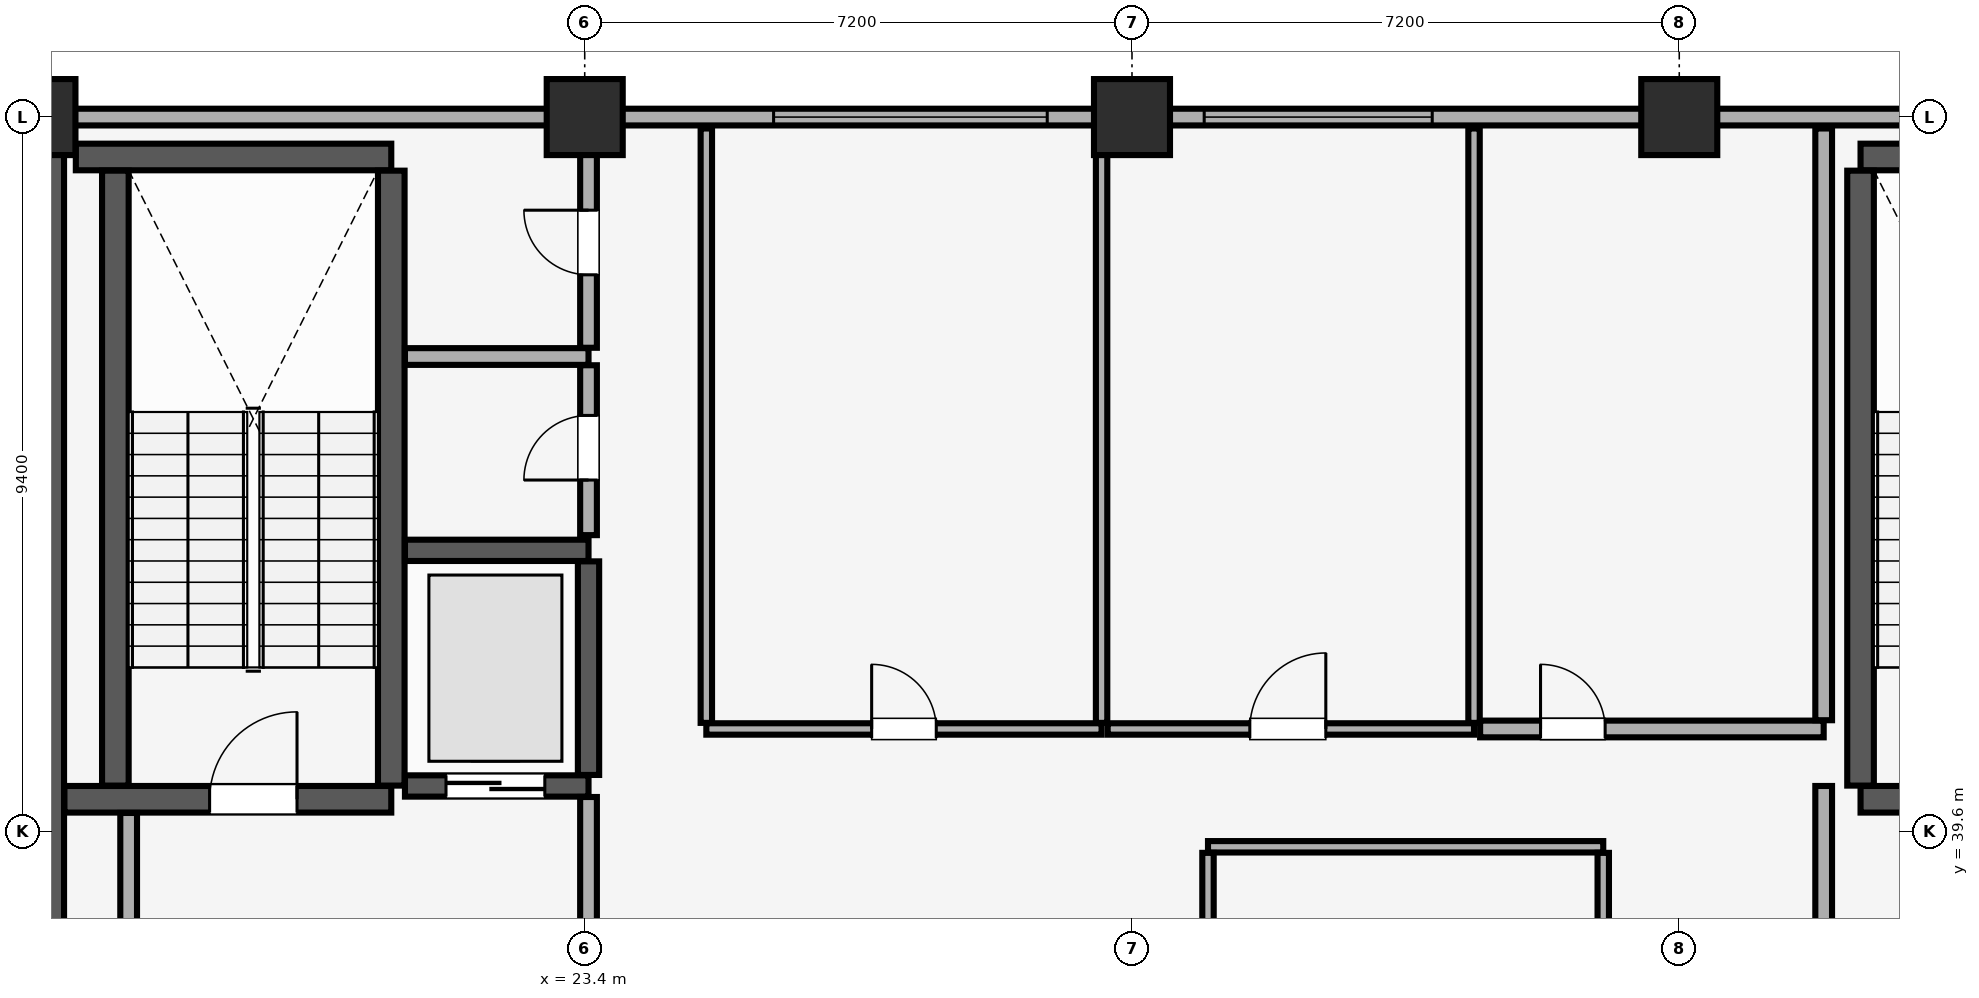
"""IFC4 building model, lengths in metres.
Left out: names, types, materials, properties, quantities, classifications, styles, units other than length and angle.
Written with IfcOpenShell. Run it as: python <this file> out.ifc"""

import sys

from ifc_helpers import new_model, si_unit, direction, frame, frame_2d, origin, origin_2d, place, context, subcontext, project, spatial, rectangle, extrude, element, fill, save


model = new_model("IFC4")
c1 = context("Model", 3, precision=1e-05, world=origin(), true_north=direction((0.0, 1.0)))
c2 = subcontext(c1, "Body", "Model", "MODEL_VIEW")
j1 = project(units=[si_unit("LENGTHUNIT", "METRE"), si_unit("PLANEANGLEUNIT", "RADIAN")], contexts=[c1])
p1 = place(None, origin())
s1 = spatial("IfcSite", under=j1, at=p1, CompositionType="ELEMENT")
p2 = place(p1, origin())
s2 = spatial("IfcBuilding", under=s1, at=p2, CompositionType="ELEMENT")
p3 = place(p2, frame((0.0, 0.0, 285.9)))
s3 = spatial("IfcBuildingStorey", under=s2, at=p3, CompositionType="ELEMENT", Elevation=285.9)
for number, where, z_axis, x_axis in (
    (1, (16.2, 49.0, 0.0), (0.0, 0.0, 1.0), (1.0, 0.0, 0.0)),
    (2, (23.4, 49.0, 0.0), (0.0, 0.0, 1.0), (1.0, 0.0, 0.0)),
    (3, (30.6, 49.0, 0.0), (0.0, 0.0, 1.0), (1.0, 0.0, 0.0)),
    (4, (37.8, 49.0, 0.0), (0.0, 0.0, 1.0), (1.0, 0.0, 0.0)),
):
    element("IfcColumn", number, at=place(p3, frame(where, z_axis=z_axis, x_axis=x_axis)), inside=s3, PredefinedType="COLUMN", context=c2, shape_type="SweptSolid", body=[
        extrude(rectangle(XDim=1.0, YDim=1.0, at=origin_2d()), origin(), (0.0, 0.0, 1.0), 4.1),
    ])
p4 = place(p3, frame((71.4, 49.0, 0.0), z_axis=(0.0, 0.0, 1.0), x_axis=(-1.0, 0.0, 0.0)))
e5 = element("IfcWall", 5, at=p4, inside=s3, PredefinedType="SOLIDWALL", context=c2, shape_type="SweptSolid", body=[
    extrude(rectangle(XDim=58.8, YDim=0.22, at=frame_2d((29.4, 0.0))), origin(), (0.0, 0.0, 1.0), 3.3),
])
p5 = place(p4, frame((56.365, 0.0, 0.85)))
e6 = element("IfcOpeningElement", 6, at=p5, cuts=e5, PredefinedType="OPENING", context=c2, shape_type="SweptSolid", body=[
    extrude(rectangle(XDim=1.5, YDim=1.4, at=frame_2d((0.75, 0.7))), frame((0.0, 0.12, 0.0), z_axis=(0.0, -1.0, 0.0), x_axis=(1.0, 0.0, 0.0)), (0.0, 0.0, 1.0), 0.24),
])
p6 = place(p4, frame((0.935, 0.0, 0.85)))
e7 = element("IfcOpeningElement", 7, at=p6, cuts=e5, PredefinedType="OPENING", context=c2, shape_type="SweptSolid", body=[
    extrude(rectangle(XDim=1.5, YDim=1.4, at=frame_2d((0.75, 0.7))), frame((0.0, 0.12, 0.0), z_axis=(0.0, -1.0, 0.0), x_axis=(1.0, 0.0, 0.0)), (0.0, 0.0, 1.0), 0.24),
])
p7 = place(p4, frame((41.915, 0.0, 0.9)))
e8 = element("IfcOpeningElement", 8, at=p7, cuts=e5, PredefinedType="OPENING", context=c2, shape_type="SweptSolid", body=[
    extrude(rectangle(XDim=3.6, YDim=1.5, at=frame_2d((1.8, 0.75))), frame((0.0, 0.12, 0.0), z_axis=(0.0, -1.0, 0.0), x_axis=(1.0, 0.0, 0.0)), (0.0, 0.0, 1.0), 0.24),
])
p8 = place(p4, frame((36.85, 0.0, 0.9)))
e9 = element("IfcOpeningElement", 9, at=p8, cuts=e5, PredefinedType="OPENING", context=c2, shape_type="SweptSolid", body=[
    extrude(rectangle(XDim=3.0, YDim=1.5, at=frame_2d((1.5, 0.75))), frame((0.0, 0.12, 0.0), z_axis=(0.0, -1.0, 0.0), x_axis=(1.0, 0.0, 0.0)), (0.0, 0.0, 1.0), 0.24),
])
p9 = place(p4, frame((19.7, 0.0, 0.9)))
e10 = element("IfcOpeningElement", 10, at=p9, cuts=e5, PredefinedType="OPENING", context=c2, shape_type="SweptSolid", body=[
    extrude(rectangle(XDim=3.6, YDim=1.5, at=frame_2d((1.8, 0.75))), frame((0.0, 0.12, 0.0), z_axis=(0.0, -1.0, 0.0), x_axis=(1.0, 0.0, 0.0)), (0.0, 0.0, 1.0), 0.24),
])
p10 = place(p4, frame((14.635, 0.0, 0.9)))
e11 = element("IfcOpeningElement", 11, at=p10, cuts=e5, PredefinedType="OPENING", context=c2, shape_type="SweptSolid", body=[
    extrude(rectangle(XDim=2.4, YDim=1.5, at=frame_2d((1.2, 0.75))), frame((0.0, 0.12, 0.0), z_axis=(0.0, -1.0, 0.0), x_axis=(1.0, 0.0, 0.0)), (0.0, 0.0, 1.0), 0.24),
])
p11 = place(p3, frame((16.2, 29.4, 0.0), z_axis=(0.0, 0.0, 1.0), x_axis=(0.0, 1.0, 0.0)))
e12 = element("IfcWall", 12, at=p11, inside=s3, PredefinedType="SHEAR", context=c2, shape_type="SweptSolid", body=[
    extrude(rectangle(XDim=19.2, YDim=0.7, at=frame_2d((9.6, 0.0))), origin(), (0.0, 0.0, 1.0), 4.1),
])
p12 = place(p3, frame((16.555, 40.025, 0.0), z_axis=(0.0, 0.0, 1.0), x_axis=(1.0, 0.0, 0.0)))
e13 = element("IfcWall", 13, at=p12, inside=s3, PredefinedType="SHEAR", context=c2, shape_type="SweptSolid", body=[
    extrude(rectangle(XDim=4.3, YDim=0.35, at=frame_2d((2.15, 0.0))), origin(), (0.0, 0.0, 1.0), 4.1),
])
p13 = place(p12, frame((1.91, 0.0, 0.0)))
e14 = element("IfcOpeningElement", 14, at=p13, cuts=e13, PredefinedType="OPENING", context=c2, shape_type="SweptSolid", body=[
    extrude(rectangle(XDim=1.15, YDim=2.15, at=frame_2d((0.575, 1.075))), frame((0.0, 0.185, 0.0), z_axis=(0.0, -1.0, 0.0), x_axis=(1.0, 0.0, 0.0)), (0.0, 0.0, 1.0), 0.37),
])
p14 = place(p3, frame((16.705, 48.475, 0.0), z_axis=(0.0, 0.0, 1.0), x_axis=(1.0, 0.0, 0.0)))
e15 = element("IfcWall", 15, at=p14, inside=s3, PredefinedType="SHEAR", context=c2, shape_type="SweptSolid", body=[
    extrude(rectangle(XDim=4.15, YDim=0.35, at=frame_2d((2.075, 0.0))), origin(), (0.0, 0.0, 1.0), 4.1),
])
for number, where, z_axis, x_axis in (
    (16, (17.225, 40.205, 0.0), (0.0, 0.0, 1.0), (0.0, 1.0, 0.0)),
    (17, (20.855, 40.205, 0.0), (0.0, 0.0, 1.0), (0.0, 1.0, 0.0)),
):
    element("IfcWall", number, at=place(p3, frame(where, z_axis=z_axis, x_axis=x_axis)), inside=s3, PredefinedType="SHEAR", context=c2, shape_type="SweptSolid", body=[
        extrude(rectangle(XDim=8.09, YDim=0.35, at=frame_2d((4.045, 0.0))), origin(), (0.0, 0.0, 1.0), 4.1),
    ])
p15 = place(p3, frame((40.185, 40.025, 0.0), z_axis=(0.0, 0.0, 1.0), x_axis=(1.0, 0.0, 0.0)))
e18 = element("IfcWall", 18, at=p15, inside=s3, PredefinedType="SHEAR", context=c2, shape_type="SweptSolid", body=[
    extrude(rectangle(XDim=3.63, YDim=0.35, at=frame_2d((1.815, 0.0))), origin(), (0.0, 0.0, 1.0), 4.1),
])
p16 = place(p15, frame((1.24, 0.0, 0.0)))
e19 = element("IfcOpeningElement", 19, at=p16, cuts=e18, PredefinedType="OPENING", context=c2, shape_type="SweptSolid", body=[
    extrude(rectangle(XDim=1.15, YDim=2.15, at=frame_2d((0.575, 1.075))), frame((0.0, 0.185, 0.0), z_axis=(0.0, -1.0, 0.0), x_axis=(1.0, 0.0, 0.0)), (0.0, 0.0, 1.0), 0.37),
])
p17 = place(p3, frame((40.185, 48.475, 0.0), z_axis=(0.0, 0.0, 1.0), x_axis=(1.0, 0.0, 0.0)))
e20 = element("IfcWall", 20, at=p17, inside=s3, PredefinedType="SHEAR", context=c2, shape_type="SweptSolid", body=[
    extrude(rectangle(XDim=3.63, YDim=0.35, at=frame_2d((1.815, 0.0))), origin(), (0.0, 0.0, 1.0), 4.1),
])
p18 = place(p3, frame((40.185, 40.205, 0.0), z_axis=(0.0, 0.0, 1.0), x_axis=(0.0, 1.0, 0.0)))
e21 = element("IfcWall", 21, at=p18, inside=s3, PredefinedType="SHEAR", context=c2, shape_type="SweptSolid", body=[
    extrude(rectangle(XDim=8.09, YDim=0.35, at=frame_2d((4.045, 0.0))), origin(), (0.0, 0.0, 1.0), 4.1),
])
p19 = place(p3, frame((21.035, 40.2, 0.0), z_axis=(0.0, 0.0, 1.0), x_axis=(1.0, 0.0, 0.0)))
e22 = element("IfcWall", 22, at=p19, inside=s3, PredefinedType="SHEAR", context=c2, shape_type="SweptSolid", body=[
    extrude(rectangle(XDim=2.415, YDim=0.28, at=frame_2d((1.208, 0.0))), origin(), (0.0, 0.0, 1.0), 4.1),
])
p20 = place(p19, frame((0.54, 0.0, 0.0)))
e23 = element("IfcOpeningElement", 23, at=p20, cuts=e22, PredefinedType="OPENING", context=c2, shape_type="SweptSolid", body=[
    extrude(rectangle(XDim=1.3, YDim=2.3, at=frame_2d((0.65, 1.15))), frame((0.0, 0.15, 0.0), z_axis=(0.0, -1.0, 0.0), x_axis=(1.0, 0.0, 0.0)), (0.0, 0.0, 1.0), 0.3),
])
p21 = place(p3, frame((21.035, 43.3, 0.0), z_axis=(0.0, 0.0, 1.0), x_axis=(1.0, 0.0, 0.0)))
e24 = element("IfcWall", 24, at=p21, inside=s3, PredefinedType="SHEAR", context=c2, shape_type="SweptSolid", body=[
    extrude(rectangle(XDim=2.415, YDim=0.28, at=frame_2d((1.208, 0.0))), origin(), (0.0, 0.0, 1.0), 4.1),
])
p22 = place(p3, frame((23.45, 40.345, 0.0), z_axis=(0.0, 0.0, 1.0), x_axis=(0.0, 1.0, 0.0)))
e25 = element("IfcWall", 25, at=p22, inside=s3, PredefinedType="SHEAR", context=c2, shape_type="SweptSolid", body=[
    extrude(rectangle(XDim=2.81, YDim=0.28, at=frame_2d((1.405, 0.0))), origin(), (0.0, 0.0, 1.0), 4.1),
])
p23 = place(p3, frame((17.4, 34.415, 0.0), z_axis=(0.0, 0.0, 1.0), x_axis=(0.0, 1.0, 0.0)))
e26 = element("IfcWall", 26, at=p23, inside=s3, PredefinedType="PARTITIONING", context=c2, shape_type="SweptSolid", body=[
    extrude(rectangle(XDim=5.43, YDim=0.22, at=frame_2d((2.715, 0.0))), origin(), (0.0, 0.0, 1.0), 4.1),
])
p24 = place(p3, frame((23.45, 34.415, 0.0), z_axis=(0.0, 0.0, 1.0), x_axis=(0.0, 1.0, 0.0)))
e27 = element("IfcWall", 27, at=p24, inside=s3, PredefinedType="PARTITIONING", context=c2, shape_type="SweptSolid", body=[
    extrude(rectangle(XDim=5.64, YDim=0.22, at=frame_2d((2.82, 0.0))), origin(), (0.0, 0.0, 1.0), 4.1),
])
p25 = place(p3, frame((39.7, 34.415, 0.0), z_axis=(0.0, 0.0, 1.0), x_axis=(0.0, 1.0, 0.0)))
e28 = element("IfcWall", 28, at=p25, inside=s3, PredefinedType="PARTITIONING", context=c2, shape_type="SweptSolid", body=[
    extrude(rectangle(XDim=5.785, YDim=0.22, at=frame_2d((2.893, 0.0))), origin(), (0.0, 0.0, 1.0), 4.1),
])
p26 = place(p3, frame((21.035, 45.85, 0.0), z_axis=(0.0, 0.0, 1.0), x_axis=(1.0, 0.0, 0.0)))
e29 = element("IfcWall", 29, at=p26, inside=s3, PredefinedType="PARTITIONING", context=c2, shape_type="SweptSolid", body=[
    extrude(rectangle(XDim=2.415, YDim=0.22, at=frame_2d((1.208, 0.0))), origin(), (0.0, 0.0, 1.0), 4.1),
])
p27 = place(p3, frame((23.45, 43.5, 0.0), z_axis=(0.0, 0.0, 1.0), x_axis=(0.0, 1.0, 0.0)))
e30 = element("IfcWall", 30, at=p27, inside=s3, PredefinedType="PARTITIONING", context=c2, shape_type="SweptSolid", body=[
    extrude(rectangle(XDim=2.235, YDim=0.22, at=frame_2d((1.118, 0.0))), origin(), (0.0, 0.0, 1.0), 4.1),
])
p28 = place(p27, frame((0.725, 0.0, 0.0)))
e31 = element("IfcOpeningElement", 31, at=p28, cuts=e30, PredefinedType="OPENING", context=c2, shape_type="SweptSolid", body=[
    extrude(rectangle(XDim=0.85, YDim=2.1, at=frame_2d((0.425, 1.05))), frame((0.0, 0.12, 0.0), z_axis=(0.0, -1.0, 0.0), x_axis=(1.0, 0.0, 0.0)), (0.0, 0.0, 1.0), 0.24),
])
p29 = place(p3, frame((23.45, 45.965, 0.0), z_axis=(0.0, 0.0, 1.0), x_axis=(0.0, 1.0, 0.0)))
e32 = element("IfcWall", 32, at=p29, inside=s3, PredefinedType="PARTITIONING", context=c2, shape_type="SweptSolid", body=[
    extrude(rectangle(XDim=2.885, YDim=0.22, at=frame_2d((1.442, 0.0))), origin(), (0.0, 0.0, 1.0), 4.1),
])
p30 = place(p29, frame((0.96, 0.0, 0.0)))
e33 = element("IfcOpeningElement", 33, at=p30, cuts=e32, PredefinedType="OPENING", context=c2, shape_type="SweptSolid", body=[
    extrude(rectangle(XDim=0.85, YDim=2.1, at=frame_2d((0.425, 1.05))), frame((0.0, 0.12, 0.0), z_axis=(0.0, -1.0, 0.0), x_axis=(1.0, 0.0, 0.0)), (0.0, 0.0, 1.0), 0.24),
])
p31 = place(p3, frame((31.6, 39.4, 0.0), z_axis=(0.0, 0.0, 1.0), x_axis=(1.0, 0.0, 0.0)))
e34 = element("IfcWall", 34, at=p31, inside=s3, PredefinedType="PARTITIONING", context=c2, shape_type="SweptSolid", body=[
    extrude(rectangle(XDim=5.2, YDim=0.15, at=frame_2d((2.6, 0.0))), origin(), (0.0, 0.0, 1.0), 4.1),
])
for number, where, z_axis, x_axis in (
    (35, (31.6, 34.38, 0.0), (0.0, 0.0, 1.0), (0.0, 1.0, 0.0)),
    (36, (36.8, 34.38, 0.0), (0.0, 0.0, 1.0), (0.0, 1.0, 0.0)),
):
    element("IfcWall", number, at=place(p3, frame(where, z_axis=z_axis, x_axis=x_axis)), inside=s3, PredefinedType="PARTITIONING", context=c2, shape_type="SweptSolid", body=[
        extrude(rectangle(XDim=4.94, YDim=0.15, at=frame_2d((2.47, 0.0))), origin(), (0.0, 0.0, 1.0), 4.1),
    ])
p32 = place(p3, frame((25.0, 40.95, 0.0), z_axis=(0.0, 0.0, 1.0), x_axis=(1.0, 0.0, 0.0)))
e37 = element("IfcWall", 37, at=p32, inside=s3, PredefinedType="PARTITIONING", context=c2, shape_type="SweptSolid", body=[
    extrude(rectangle(XDim=5.2, YDim=0.15, at=frame_2d((2.6, 0.0))), origin(), (0.0, 0.0, 1.0), 4.1),
])
p33 = place(p32, frame((2.175, 0.0, 0.0)))
e38 = element("IfcOpeningElement", 38, at=p33, cuts=e37, PredefinedType="OPENING", context=c2, shape_type="SweptSolid", body=[
    extrude(rectangle(XDim=0.85, YDim=2.1, at=frame_2d((0.425, 1.05))), frame((0.0, 0.085, 0.0), z_axis=(0.0, -1.0, 0.0), x_axis=(1.0, 0.0, 0.0)), (0.0, 0.0, 1.0), 0.17),
])
for number, where, z_axis, x_axis in (
    (39, (25.0, 41.03, 0.0), (0.0, 0.0, 1.0), (0.0, 1.0, 0.0)),
    (40, (30.2, 41.03, 0.0), (0.0, 0.0, 1.0), (0.0, 1.0, 0.0)),
):
    element("IfcWall", number, at=place(p3, frame(where, z_axis=z_axis, x_axis=x_axis)), inside=s3, PredefinedType="PARTITIONING", context=c2, shape_type="SweptSolid", body=[
        extrude(rectangle(XDim=7.82, YDim=0.15, at=frame_2d((3.91, 0.0))), origin(), (0.0, 0.0, 1.0), 4.1),
    ])
p34 = place(p3, frame((30.28, 40.95, 0.0), z_axis=(0.0, 0.0, 1.0), x_axis=(1.0, 0.0, 0.0)))
e41 = element("IfcWall", 41, at=p34, inside=s3, PredefinedType="PARTITIONING", context=c2, shape_type="SweptSolid", body=[
    extrude(rectangle(XDim=4.82, YDim=0.15, at=frame_2d((2.41, 0.0))), origin(), (0.0, 0.0, 1.0), 4.1),
])
p35 = place(p34, frame((1.87, 0.0, 0.0)))
e42 = element("IfcOpeningElement", 42, at=p35, cuts=e41, PredefinedType="OPENING", context=c2, shape_type="SweptSolid", body=[
    extrude(rectangle(XDim=1.0, YDim=2.15, at=frame_2d((0.5, 1.075))), frame((0.0, 0.085, 0.0), z_axis=(0.0, -1.0, 0.0), x_axis=(1.0, 0.0, 0.0)), (0.0, 0.0, 1.0), 0.17),
])
p36 = place(p3, frame((35.1, 41.03, 0.0), z_axis=(0.0, 0.0, 1.0), x_axis=(0.0, 1.0, 0.0)))
e43 = element("IfcWall", 43, at=p36, inside=s3, PredefinedType="PARTITIONING", context=c2, shape_type="SweptSolid", body=[
    extrude(rectangle(XDim=7.82, YDim=0.15, at=frame_2d((3.91, 0.0))), origin(), (0.0, 0.0, 1.0), 4.1),
])
p37 = place(p3, frame((35.18, 40.95, 0.0), z_axis=(0.0, 0.0, 1.0), x_axis=(1.0, 0.0, 0.0)))
e44 = element("IfcWall", 44, at=p37, inside=s3, PredefinedType="PARTITIONING", context=c2, shape_type="SweptSolid", body=[
    extrude(rectangle(XDim=4.52, YDim=0.22, at=frame_2d((2.26, 0.0))), origin(), (0.0, 0.0, 1.0), 4.1),
])
p38 = place(p37, frame((0.795, 0.0, 0.0)))
e45 = element("IfcOpeningElement", 45, at=p38, cuts=e44, PredefinedType="OPENING", context=c2, shape_type="SweptSolid", body=[
    extrude(rectangle(XDim=0.85, YDim=2.1, at=frame_2d((0.425, 1.05))), frame((0.0, 0.12, 0.0), z_axis=(0.0, -1.0, 0.0), x_axis=(1.0, 0.0, 0.0)), (0.0, 0.0, 1.0), 0.24),
])
p39 = place(p3, frame((39.7, 41.065, 0.0), z_axis=(0.0, 0.0, 1.0), x_axis=(0.0, 1.0, 0.0)))
e46 = element("IfcWall", 46, at=p39, inside=s3, PredefinedType="PARTITIONING", context=c2, shape_type="SweptSolid", body=[
    extrude(rectangle(XDim=7.785, YDim=0.22, at=frame_2d((3.893, 0.0))), origin(), (0.0, 0.0, 1.0), 4.1),
])
p40 = place(p7, origin())
e47 = element("IfcWindow", 47, at=p40, inside=s3, PartitioningType="SINGLE_PANEL", PredefinedType="WINDOW", context=c2, shape_type="SweptSolid", body=[
    extrude(rectangle(XDim=3.6, YDim=1.5, at=frame_2d((1.8, 0.75))), frame((0.0, 0.03, 0.0), z_axis=(0.0, -1.0, 0.0), x_axis=(1.0, 0.0, 0.0)), (0.0, 0.0, 1.0), 0.06),
])
fill(e8, e47)
p41 = place(p8, origin())
e48 = element("IfcWindow", 48, at=p41, inside=s3, PartitioningType="SINGLE_PANEL", PredefinedType="WINDOW", context=c2, shape_type="SweptSolid", body=[
    extrude(rectangle(XDim=3.0, YDim=1.5, at=frame_2d((1.5, 0.75))), frame((0.0, 0.03, 0.0), z_axis=(0.0, -1.0, 0.0), x_axis=(1.0, 0.0, 0.0)), (0.0, 0.0, 1.0), 0.06),
])
fill(e9, e48)
p42 = place(p13, origin())
e49 = element("IfcDoor", 49, at=p42, inside=s3, OperationType="SINGLE_SWING_RIGHT", PredefinedType="DOOR", context=c2, shape_type="SweptSolid", body=[
    extrude(rectangle(XDim=1.15, YDim=2.15, at=frame_2d((0.575, 1.075))), frame((0.0, 0.025, 0.0), z_axis=(0.0, -1.0, 0.0), x_axis=(1.0, 0.0, 0.0)), (0.0, 0.0, 1.0), 0.05),
])
fill(e14, e49)
p43 = place(p20, origin())
e50 = element("IfcDoor", 50, at=p43, inside=s3, OperationType="DOUBLE_DOOR_SLIDING", PredefinedType="DOOR", context=c2, shape_type="SweptSolid", body=[
    extrude(rectangle(XDim=1.3, YDim=2.3, at=frame_2d((0.65, 1.15))), frame((0.0, 0.025, 0.0), z_axis=(0.0, -1.0, 0.0), x_axis=(1.0, 0.0, 0.0)), (0.0, 0.0, 1.0), 0.05),
])
fill(e23, e50)
p44 = place(p28, origin())
e51 = element("IfcDoor", 51, at=p44, inside=s3, OperationType="SINGLE_SWING_LEFT", PredefinedType="DOOR", context=c2, shape_type="SweptSolid", body=[
    extrude(rectangle(XDim=0.85, YDim=2.1, at=frame_2d((0.425, 1.05))), frame((0.0, 0.025, 0.0), z_axis=(0.0, -1.0, 0.0), x_axis=(1.0, 0.0, 0.0)), (0.0, 0.0, 1.0), 0.05),
])
fill(e31, e51)
p45 = place(p30, origin())
e52 = element("IfcDoor", 52, at=p45, inside=s3, OperationType="SINGLE_SWING_RIGHT", PredefinedType="DOOR", context=c2, shape_type="SweptSolid", body=[
    extrude(rectangle(XDim=0.85, YDim=2.1, at=frame_2d((0.425, 1.05))), frame((0.0, 0.025, 0.0), z_axis=(0.0, -1.0, 0.0), x_axis=(1.0, 0.0, 0.0)), (0.0, 0.0, 1.0), 0.05),
])
fill(e33, e52)
p46 = place(p33, origin())
e53 = element("IfcDoor", 53, at=p46, inside=s3, OperationType="SINGLE_SWING_LEFT", PredefinedType="DOOR", context=c2, shape_type="SweptSolid", body=[
    extrude(rectangle(XDim=0.85, YDim=2.1, at=frame_2d((0.425, 1.05))), frame((0.0, 0.025, 0.0), z_axis=(0.0, -1.0, 0.0), x_axis=(1.0, 0.0, 0.0)), (0.0, 0.0, 1.0), 0.05),
])
fill(e38, e53)
p47 = place(p35, origin())
e54 = element("IfcDoor", 54, at=p47, inside=s3, OperationType="SINGLE_SWING_RIGHT", PredefinedType="DOOR", context=c2, shape_type="SweptSolid", body=[
    extrude(rectangle(XDim=1.0, YDim=2.15, at=frame_2d((0.5, 1.075))), frame((0.0, 0.025, 0.0), z_axis=(0.0, -1.0, 0.0), x_axis=(1.0, 0.0, 0.0)), (0.0, 0.0, 1.0), 0.05),
])
fill(e42, e54)
p48 = place(p38, origin())
e55 = element("IfcDoor", 55, at=p48, inside=s3, OperationType="SINGLE_SWING_LEFT", PredefinedType="DOOR", context=c2, shape_type="SweptSolid", body=[
    extrude(rectangle(XDim=0.85, YDim=2.1, at=frame_2d((0.425, 1.05))), frame((0.0, 0.025, 0.0), z_axis=(0.0, -1.0, 0.0), x_axis=(1.0, 0.0, 0.0)), (0.0, 0.0, 1.0), 0.05),
])
fill(e45, e55)
save(model, sys.argv[1])
